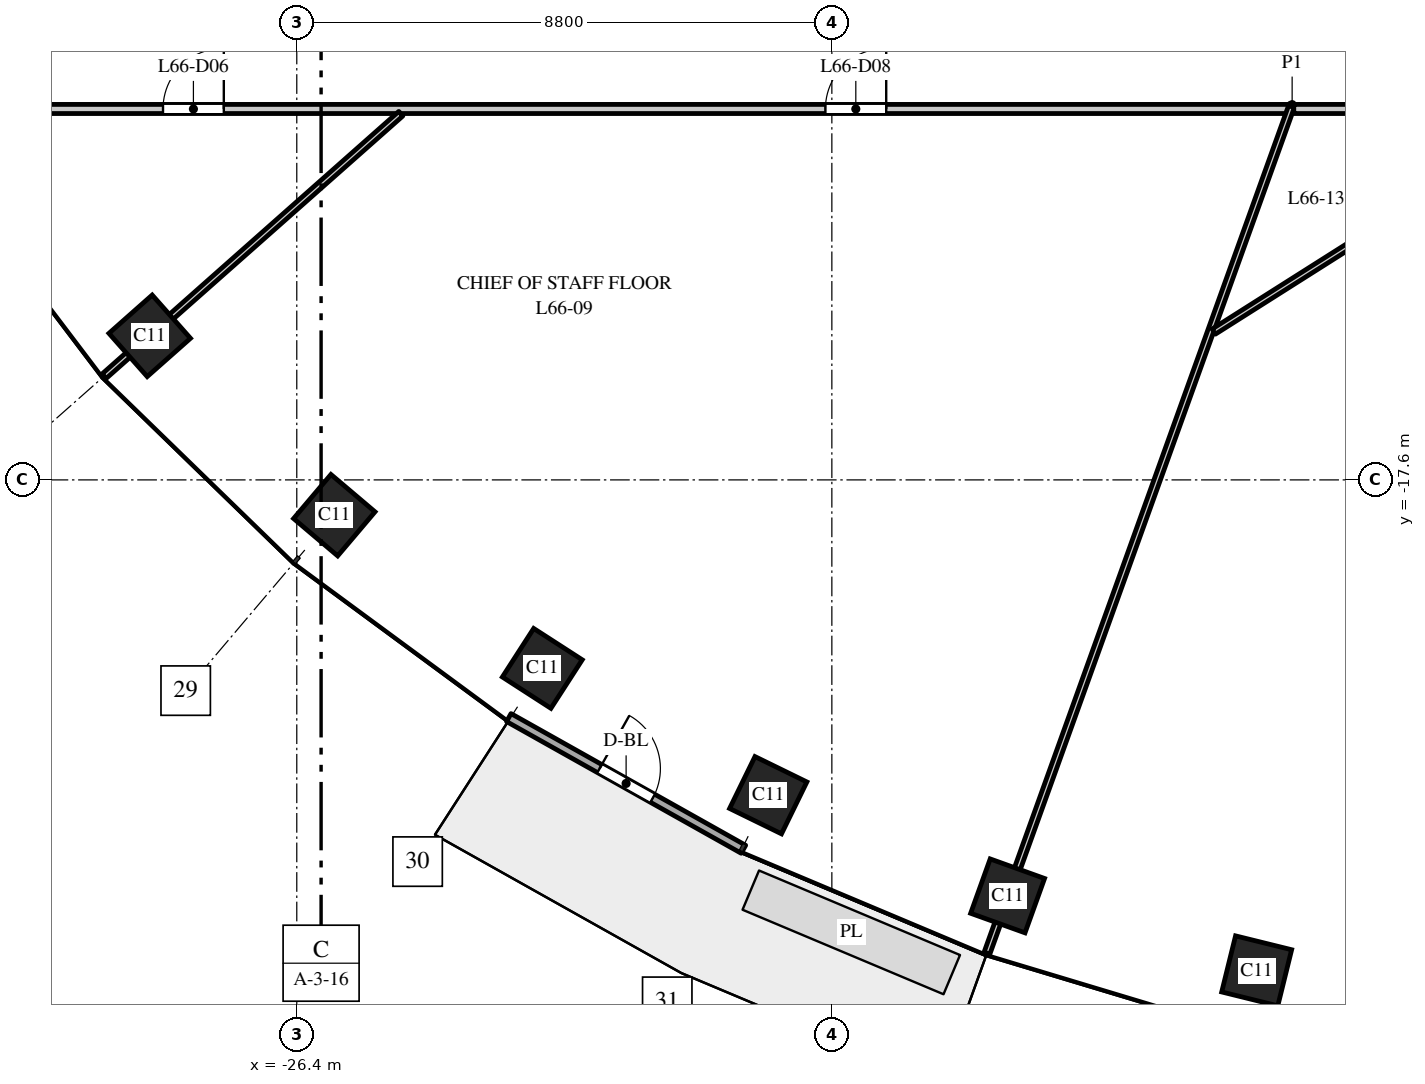
"""IFC4 building model, lengths in metres.
Left out: names, types, materials, properties, quantities, classifications, styles, units other than length and angle.
Written with IfcOpenShell. Run it as: python <this file> out.ifc"""

import sys

from ifc_helpers import new_model, si_unit, direction, frame, frame_2d, origin, origin_2d, place, context, subcontext, project, spatial, rectangle, extrude, element, fill, save


model = new_model("IFC4")
c1 = context("Model", 3, precision=1e-05, world=origin(), true_north=direction((0.0, 1.0)))
c2 = subcontext(c1, "Body", "Model", "MODEL_VIEW")
j1 = project(units=[si_unit("LENGTHUNIT", "METRE"), si_unit("PLANEANGLEUNIT", "RADIAN")], contexts=[c1])
p1 = place(None, origin())
s1 = spatial("IfcSite", under=j1, at=p1, CompositionType="ELEMENT")
p2 = place(p1, origin())
s2 = spatial("IfcBuilding", under=s1, at=p2, CompositionType="ELEMENT")
p3 = place(p2, frame((0.0, 0.0, 307.0)))
s3 = spatial("IfcBuildingStorey", under=s2, at=p3, CompositionType="ELEMENT", Elevation=307.0)
for number, where, z_axis, x_axis in (
    (1, (-28.819, -15.23, 0.0), (0.0, 0.0, 1.0), (0.663, -0.749, 0.0)),
    (2, (-25.783, -18.18, 0.0), (0.0, 0.0, 1.0), (0.763, -0.646, 0.0)),
    (3, (-22.362, -20.7, 0.0), (0.0, 0.0, 1.0), (0.84, -0.542, 0.0)),
    (4, (-18.646, -22.785, 0.0), (0.0, 0.0, 1.0), (0.898, -0.439, 0.0)),
    (5, (-14.709, -24.441, 0.0), (0.0, 0.0, 1.0), (0.941, -0.338, 0.0)),
    (6, (-10.613, -25.674, 0.0), (0.0, 0.0, 1.0), (0.971, -0.24, 0.0)),
):
    element("IfcColumn", number, at=place(p3, frame(where, z_axis=z_axis, x_axis=x_axis)), inside=s3, PredefinedType="COLUMN", context=c2, shape_type="SweptSolid", body=[
        extrude(rectangle(XDim=0.95, YDim=0.95, at=origin_2d()), origin(), (0.0, 0.0, 1.0), 4.0),
    ])
p4 = place(p3, frame((-22.913, -21.509, 0.0), z_axis=(0.0, 0.0, 1.0), x_axis=(0.872046572975, -0.489422899509, 0.0)))
e7 = element("IfcWall", 7, at=p4, inside=s3, PredefinedType="STANDARD", context=c2, shape_type="SweptSolid", body=[
    extrude(rectangle(XDim=4.426, YDim=0.15, at=frame_2d((2.213, 0.0))), origin(), (0.0, 0.0, 1.0), 3.7),
])
p5 = place(p4, frame((1.713, 0.0, 0.0)))
e8 = element("IfcOpeningElement", 8, at=p5, cuts=e7, PredefinedType="OPENING", context=c2, shape_type="SweptSolid", body=[
    extrude(rectangle(XDim=1.0, YDim=2.4, at=frame_2d((0.5, 1.2))), frame((0.0, 0.085, 0.0), z_axis=(0.0, -1.0, 0.0), x_axis=(1.0, 0.0, 0.0)), (0.0, 0.0, 1.0), 0.17),
])
p6 = place(p3, frame((-31.5, -11.5, 0.0), z_axis=(0.0, 0.0, 1.0), x_axis=(1.0, 0.0, 0.0)))
e9 = element("IfcWall", 9, at=p6, inside=s3, PredefinedType="PARTITIONING", context=c2, shape_type="SweptSolid", body=[
    extrude(rectangle(XDim=21.432, YDim=0.15, at=frame_2d((10.716, 0.0))), origin(), (0.0, 0.0, 1.0), 2.75),
])
p7 = place(p6, frame((2.9, 0.0, 0.0)))
e10 = element("IfcOpeningElement", 10, at=p7, cuts=e9, PredefinedType="OPENING", context=c2, shape_type="SweptSolid", body=[
    extrude(rectangle(XDim=1.0, YDim=2.1, at=frame_2d((0.5, 1.05))), frame((0.0, 0.085, 0.0), z_axis=(0.0, -1.0, 0.0), x_axis=(1.0, 0.0, 0.0)), (0.0, 0.0, 1.0), 0.17),
])
p8 = place(p6, frame((13.794, 0.0, 0.0)))
e11 = element("IfcOpeningElement", 11, at=p8, cuts=e9, PredefinedType="OPENING", context=c2, shape_type="SweptSolid", body=[
    extrude(rectangle(XDim=1.0, YDim=2.1, at=frame_2d((0.5, 1.05))), frame((0.0, 0.085, 0.0), z_axis=(0.0, -1.0, 0.0), x_axis=(1.0, 0.0, 0.0)), (0.0, 0.0, 1.0), 0.17),
])
p9 = place(p3, frame((-29.569, -15.895, 0.0), z_axis=(0.0, 0.0, 1.0), x_axis=(0.748988695283, 0.662582775461, 0.0)))
e12 = element("IfcWall", 12, at=p9, inside=s3, PredefinedType="PARTITIONING", context=c2, shape_type="SweptSolid", body=[
    extrude(rectangle(XDim=6.516, YDim=0.1, at=frame_2d((3.258, 0.0))), origin(), (0.0, 0.0, 1.0), 3.0),
])
p10 = place(p3, frame((-15.049, -25.383, 0.0), z_axis=(0.0, 0.0, 1.0), x_axis=(0.338454781071, 0.94098265721, 0.0)))
e13 = element("IfcWall", 13, at=p10, inside=s3, PredefinedType="PARTITIONING", context=c2, shape_type="SweptSolid", body=[
    extrude(rectangle(XDim=14.829, YDim=0.1, at=frame_2d((7.415, 0.0))), origin(), (0.0, 0.0, 1.0), 2.75),
])
p11 = place(p3, frame((-11.319, -15.161, 0.0), z_axis=(0.0, 0.0, 1.0), x_axis=(0.844865171483, 0.534979291203, 0.0)))
e14 = element("IfcWall", 14, at=p11, inside=s3, PredefinedType="PARTITIONING", context=c2, shape_type="SweptSolid", body=[
    extrude(rectangle(XDim=6.703, YDim=0.1, at=frame_2d((3.352, 0.0))), origin(), (0.0, 0.0, 1.0), 3.7),
])
p12 = place(p3, frame((-10.003, -11.5, 0.0), z_axis=(0.0, 0.0, 1.0), x_axis=(1.0, 0.0, 0.0)))
e15 = element("IfcWall", 15, at=p12, inside=s3, PredefinedType="PARTITIONING", context=c2, shape_type="SweptSolid", body=[
    extrude(rectangle(XDim=8.298, YDim=0.15, at=frame_2d((4.149, 0.0))), origin(), (0.0, 0.0, 1.0), 2.75),
])
p13 = place(p12, frame((5.86, 0.0, 0.0)))
e16 = element("IfcOpeningElement", 16, at=p13, cuts=e15, PredefinedType="OPENING", context=c2, shape_type="SweptSolid", body=[
    extrude(rectangle(XDim=1.0, YDim=2.1, at=frame_2d((0.5, 1.05))), frame((0.0, 0.085, 0.0), z_axis=(0.0, -1.0, 0.0), x_axis=(1.0, 0.0, 0.0)), (0.0, 0.0, 1.0), 0.17),
])
p14 = place(p12, frame((1.335, 0.0, 0.0)))
e17 = element("IfcOpeningElement", 17, at=p14, cuts=e15, PredefinedType="OPENING", context=c2, shape_type="SweptSolid", body=[
    extrude(rectangle(XDim=1.0, YDim=2.1, at=frame_2d((0.5, 1.05))), frame((0.0, 0.085, 0.0), z_axis=(0.0, -1.0, 0.0), x_axis=(1.0, 0.0, 0.0)), (0.0, 0.0, 1.0), 0.17),
])
p15 = place(p5, origin())
e18 = element("IfcDoor", 18, at=p15, inside=s3, OperationType="SINGLE_SWING_LEFT", PredefinedType="DOOR", context=c2, shape_type="SweptSolid", body=[
    extrude(rectangle(XDim=1.0, YDim=2.4, at=frame_2d((0.5, 1.2))), frame((0.0, 0.025, 0.0), z_axis=(0.0, -1.0, 0.0), x_axis=(1.0, 0.0, 0.0)), (0.0, 0.0, 1.0), 0.05),
])
fill(e8, e18)
p16 = place(p7, origin())
e19 = element("IfcDoor", 19, at=p16, inside=s3, OperationType="SINGLE_SWING_RIGHT", PredefinedType="DOOR", context=c2, shape_type="SweptSolid", body=[
    extrude(rectangle(XDim=1.0, YDim=2.1, at=frame_2d((0.5, 1.05))), frame((0.0, 0.025, 0.0), z_axis=(0.0, -1.0, 0.0), x_axis=(1.0, 0.0, 0.0)), (0.0, 0.0, 1.0), 0.05),
])
fill(e10, e19)
p17 = place(p8, origin())
e20 = element("IfcDoor", 20, at=p17, inside=s3, OperationType="SINGLE_SWING_RIGHT", PredefinedType="DOOR", context=c2, shape_type="SweptSolid", body=[
    extrude(rectangle(XDim=1.0, YDim=2.1, at=frame_2d((0.5, 1.05))), frame((0.0, 0.025, 0.0), z_axis=(0.0, -1.0, 0.0), x_axis=(1.0, 0.0, 0.0)), (0.0, 0.0, 1.0), 0.05),
])
fill(e11, e20)
save(model, sys.argv[1])
